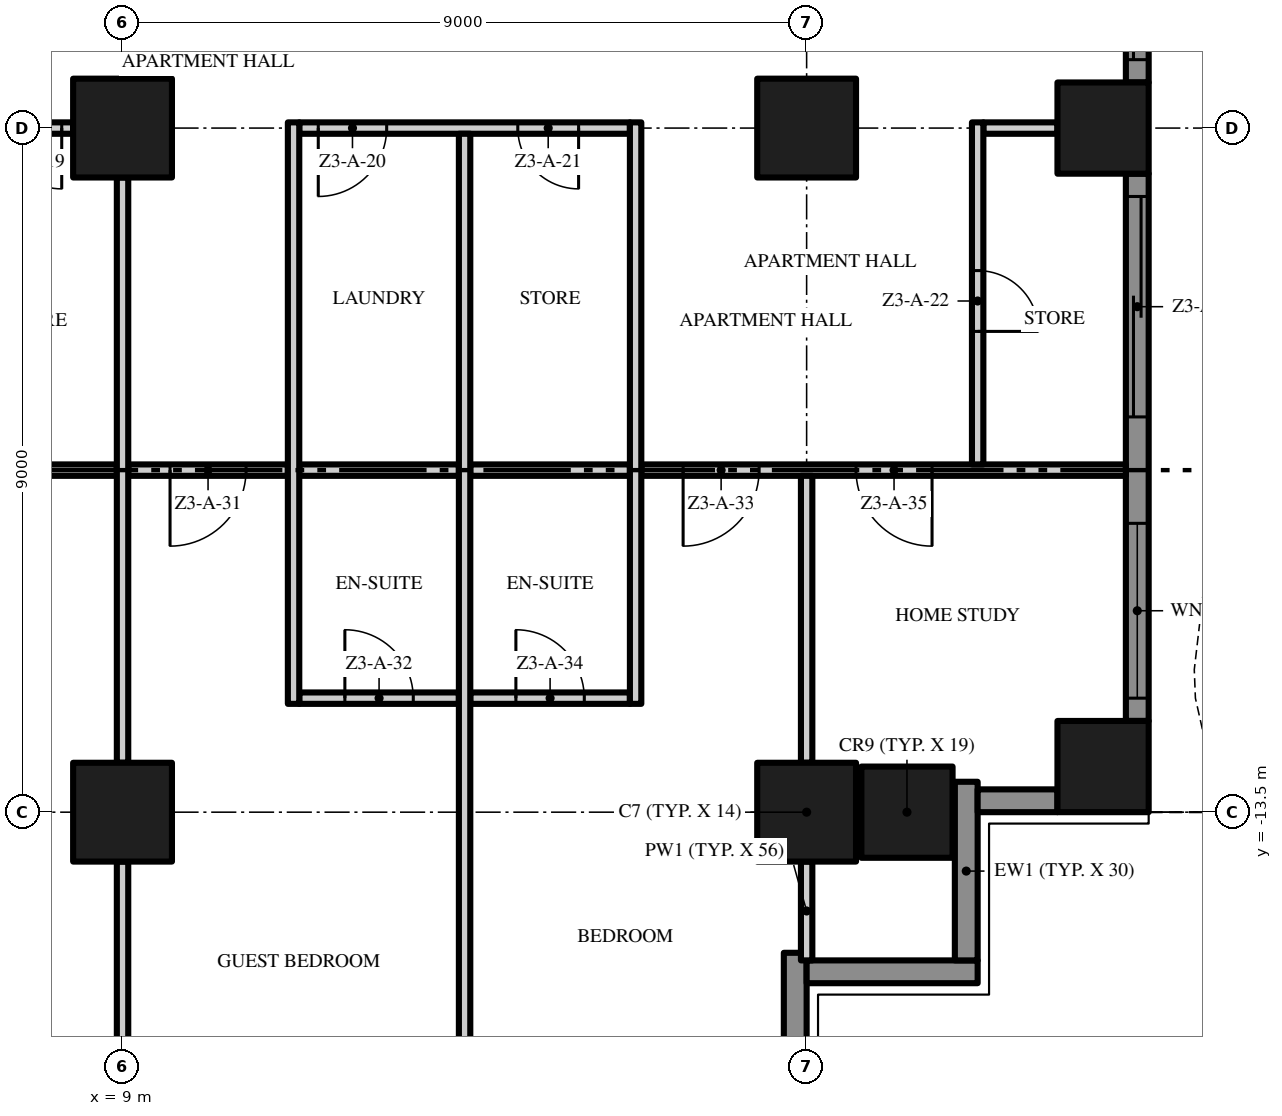
"""IFC4 building model, lengths in metres.
Left out: names, types, materials, properties, quantities, classifications, styles, units other than length and angle.
Written with IfcOpenShell. Run it as: python <this file> out.ifc"""

import sys

from ifc_helpers import new_model, si_unit, direction, frame, frame_2d, origin, origin_2d, place, context, subcontext, project, spatial, polyline, rectangle, outline, extrude, element, fill, save


model = new_model("IFC4")
c1 = context("Model", 3, precision=1e-05, world=origin(), true_north=direction((0.0, 1.0)))
c2 = subcontext(c1, "Body", "Model", "MODEL_VIEW")
j1 = project(units=[si_unit("LENGTHUNIT", "METRE"), si_unit("PLANEANGLEUNIT", "RADIAN")], contexts=[c1])
p1 = place(None, origin())
s1 = spatial("IfcSite", under=j1, at=p1, CompositionType="ELEMENT")
p2 = place(p1, origin())
s2 = spatial("IfcBuilding", under=s1, at=p2, CompositionType="ELEMENT")
p3 = place(p2, frame((0.0, 0.0, 132.6)))
s3 = spatial("IfcBuildingStorey", under=s2, at=p3, CompositionType="ELEMENT", Elevation=132.6)
for number, where, z_axis, x_axis in (
    (1, (18.0, -13.5, 0.0), (0.0, 0.0, 1.0), (1.0, 0.0, 0.0)),
    (2, (18.0, -4.5, 0.0), (0.0, 0.0, 1.0), (1.0, 0.0, 0.0)),
):
    element("IfcColumn", number, at=place(p3, frame(where, z_axis=z_axis, x_axis=x_axis)), inside=s3, PredefinedType="COLUMN", context=c2, shape_type="SweptSolid", body=[
        extrude(rectangle(XDim=1.3, YDim=1.3, at=origin_2d()), origin(), (0.0, 0.0, 1.0), 3.5),
    ])
for number, where, z_axis, x_axis in (
    (3, (21.9, -12.9, 0.0), (0.0, 0.0, 1.0), (1.0, 0.0, 0.0)),
    (4, (19.32, -13.5, 0.0), (0.0, 0.0, 1.0), (1.0, 0.0, 0.0)),
    (5, (21.9, -4.5, 0.0), (0.0, 0.0, 1.0), (1.0, 0.0, 0.0)),
):
    element("IfcColumn", number, at=place(p3, frame(where, z_axis=z_axis, x_axis=x_axis)), inside=s3, PredefinedType="COLUMN", context=c2, shape_type="SweptSolid", body=[
        extrude(rectangle(XDim=1.2, YDim=1.2, at=origin_2d()), origin(), (0.0, 0.0, 1.0), 3.5),
    ])
for number, where, z_axis, x_axis in (
    (6, (9.0, -13.5, 0.0), (0.0, 0.0, 1.0), (1.0, 0.0, 0.0)),
    (7, (9.0, -4.5, 0.0), (0.0, 0.0, 1.0), (1.0, 0.0, 0.0)),
):
    element("IfcColumn", number, at=place(p3, frame(where, z_axis=z_axis, x_axis=x_axis)), inside=s3, PredefinedType="COLUMN", context=c2, shape_type="SweptSolid", body=[
        extrude(rectangle(XDim=1.3, YDim=1.3, at=origin_2d()), origin(), (0.0, 0.0, 1.0), 3.5),
    ])
p4 = place(p3, frame((17.85, -15.35, 0.0), z_axis=(0.0, 0.0, 1.0), x_axis=(0.0, -1.0, 0.0)))
e8 = element("IfcWall", 8, at=p4, inside=s3, PredefinedType="SOLIDWALL", context=c2, shape_type="SweptSolid", body=[
    extrude(rectangle(XDim=1.45, YDim=0.3, at=frame_2d((0.725, 0.0))), origin(), (0.0, 0.0, 1.0), 3.5),
])
p5 = place(p3, frame((20.25, -15.6, 0.0), z_axis=(0.0, 0.0, 1.0), x_axis=(-1.0, 0.0, 0.0)))
e9 = element("IfcWall", 9, at=p5, inside=s3, PredefinedType="SOLIDWALL", context=c2, shape_type="SweptSolid", body=[
    extrude(rectangle(XDim=2.25, YDim=0.3, at=frame_2d((1.125, 0.0))), origin(), (0.0, 0.0, 1.0), 3.5),
])
p6 = place(p3, frame((20.1, -13.1, 0.0), z_axis=(0.0, 0.0, 1.0), x_axis=(0.0, -1.0, 0.0)))
e10 = element("IfcWall", 10, at=p6, inside=s3, PredefinedType="SOLIDWALL", context=c2, shape_type="SweptSolid", body=[
    extrude(rectangle(XDim=2.35, YDim=0.3, at=frame_2d((1.175, 0.0))), origin(), (0.0, 0.0, 1.0), 3.5),
])
p7 = place(p3, frame((21.3, -13.35, 0.0), z_axis=(0.0, 0.0, 1.0), x_axis=(-1.0, 0.0, 0.0)))
e11 = element("IfcWall", 11, at=p7, inside=s3, PredefinedType="SOLIDWALL", context=c2, shape_type="SweptSolid", body=[
    extrude(rectangle(XDim=1.05, YDim=0.3, at=frame_2d((0.525, 0.0))), origin(), (0.0, 0.0, 1.0), 3.5),
])
p8 = place(p3, frame((22.35, -5.1, 0.0), z_axis=(0.0, 0.0, 1.0), x_axis=(0.0, -1.0, 0.0)))
e12 = element("IfcWall", 12, at=p8, inside=s3, PredefinedType="SOLIDWALL", context=c2, shape_type="SweptSolid", body=[
    extrude(rectangle(XDim=7.2, YDim=0.3, at=frame_2d((3.6, 0.0))), origin(), (0.0, 0.0, 1.0), 3.5),
])
p9 = place(p8, frame((4.6, 0.0, 0.45)))
e13 = element("IfcOpeningElement", 13, at=p9, cuts=e12, PredefinedType="OPENING", context=c2, shape_type="SweptSolid", body=[
    extrude(rectangle(XDim=2.3, YDim=2.65, at=frame_2d((1.15, 1.325))), frame((0.0, 0.16, 0.0), z_axis=(0.0, -1.0, 0.0), x_axis=(1.0, 0.0, 0.0)), (0.0, 0.0, 1.0), 0.32),
])
p10 = place(p8, frame((0.3, 0.0, 0.0)))
e14 = element("IfcOpeningElement", 14, at=p10, cuts=e12, PredefinedType="OPENING", context=c2, shape_type="SweptSolid", body=[
    extrude(rectangle(XDim=2.9, YDim=2.4, at=frame_2d((1.45, 1.2))), frame((0.0, 0.16, 0.0), z_axis=(0.0, -1.0, 0.0), x_axis=(1.0, 0.0, 0.0)), (0.0, 0.0, 1.0), 0.32),
])
p11 = place(p3, frame((22.35, 3.9, 0.0), z_axis=(0.0, 0.0, 1.0), x_axis=(0.0, -1.0, 0.0)))
e15 = element("IfcWall", 15, at=p11, inside=s3, PredefinedType="SOLIDWALL", context=c2, shape_type="SweptSolid", body=[
    extrude(rectangle(XDim=7.8, YDim=0.3, at=frame_2d((3.9, 0.0))), origin(), (0.0, 0.0, 1.0), 3.5),
])
p12 = place(p11, frame((4.6, 0.0, 0.0)))
e16 = element("IfcOpeningElement", 16, at=p12, cuts=e15, PredefinedType="OPENING", context=c2, shape_type="SweptSolid", body=[
    extrude(rectangle(XDim=2.9, YDim=2.4, at=frame_2d((1.45, 1.2))), frame((0.0, 0.16, 0.0), z_axis=(0.0, -1.0, 0.0), x_axis=(1.0, 0.0, 0.0)), (0.0, 0.0, 1.0), 0.32),
])
p13 = place(p11, frame((0.3, 0.0, 0.45)))
e17 = element("IfcOpeningElement", 17, at=p13, cuts=e15, PredefinedType="OPENING", context=c2, shape_type="SweptSolid", body=[
    extrude(rectangle(XDim=2.9, YDim=2.65, at=frame_2d((1.45, 1.325))), frame((0.0, 0.16, 0.0), z_axis=(0.0, -1.0, 0.0), x_axis=(1.0, 0.0, 0.0)), (0.0, 0.0, 1.0), 0.32),
])
p14 = place(p3, origin())
e18 = element("IfcWall", 18, at=p14, inside=s3, PredefinedType="USERDEFINED", context=c2, shape_type="SweptSolid", body=[
    extrude(outline(polyline([(23.451, -13.5), (23.115, -12.0), (23.1, -11.625), (23.231, -10.5), (23.755, -9.0), (24.488, -7.5), (25.149, -6.0), (25.485, -4.5), (25.5, -4.125), (25.369, -3.0), (24.845, -1.5), (24.112, 0.0), (23.451, 1.5), (23.115, 3.0), (23.1, 3.375), (23.231, 4.5), (23.755, 6.0), (24.488, 7.5), (25.149, 9.0), (25.485, 10.5), (25.5, 10.875), (25.369, 12.0), (24.845, 13.5), (24.112, 15.0), (23.451, 16.5), (23.115, 18.0), (22.871, 17.945), (23.213, 16.421), (23.885, 14.895), (24.614, 13.404), (25.124, 11.944), (25.249, 10.865), (25.236, 10.533), (24.91, 9.079), (24.261, 7.605), (23.524, 6.096), (22.986, 4.556), (22.849, 3.385), (22.866, 2.967), (23.213, 1.421), (23.885, -0.105), (24.614, -1.596), (25.124, -3.056), (25.249, -4.135), (25.236, -4.467), (24.91, -5.921), (24.261, -7.395), (23.524, -8.904), (22.986, -10.444), (22.849, -11.615), (22.866, -12.033), (23.208, -13.555), (23.451, -13.5)])), origin(), (0.0, 0.0, 1.0), 0.9),
])
p15 = place(p3, frame((11.325, -12.0, 0.0), z_axis=(0.0, 0.0, 1.0), x_axis=(1.0, 0.0, 0.0)))
e19 = element("IfcWall", 19, at=p15, inside=s3, PredefinedType="PARTITIONING", context=c2, shape_type="SweptSolid", body=[
    extrude(rectangle(XDim=2.1, YDim=0.15, at=frame_2d((1.05, 0.0))), origin(), (0.0, 0.0, 1.0), 3.5),
])
p16 = place(p15, frame((0.6, 0.0, 0.0)))
e20 = element("IfcOpeningElement", 20, at=p16, cuts=e19, PredefinedType="OPENING", context=c2, shape_type="SweptSolid", body=[
    extrude(rectangle(XDim=0.9, YDim=2.1, at=frame_2d((0.45, 1.05))), frame((0.0, 0.085, 0.0), z_axis=(0.0, -1.0, 0.0), x_axis=(1.0, 0.0, 0.0)), (0.0, 0.0, 1.0), 0.17),
])
p17 = place(p3, frame((13.575, -12.0, 0.0), z_axis=(0.0, 0.0, 1.0), x_axis=(1.0, 0.0, 0.0)))
e21 = element("IfcWall", 21, at=p17, inside=s3, PredefinedType="PARTITIONING", context=c2, shape_type="SweptSolid", body=[
    extrude(rectangle(XDim=2.1, YDim=0.15, at=frame_2d((1.05, 0.0))), origin(), (0.0, 0.0, 1.0), 3.5),
])
p18 = place(p17, frame((0.6, 0.0, 0.0)))
e22 = element("IfcOpeningElement", 22, at=p18, cuts=e21, PredefinedType="OPENING", context=c2, shape_type="SweptSolid", body=[
    extrude(rectangle(XDim=0.9, YDim=2.1, at=frame_2d((0.45, 1.05))), frame((0.0, 0.085, 0.0), z_axis=(0.0, -1.0, 0.0), x_axis=(1.0, 0.0, 0.0)), (0.0, 0.0, 1.0), 0.17),
])
p19 = place(p3, frame((8.925, -9.0, 0.0), z_axis=(0.0, 0.0, 1.0), x_axis=(-1.0, 0.0, 0.0)))
e23 = element("IfcWall", 23, at=p19, inside=s3, PredefinedType="PARTITIONING", context=c2, shape_type="SweptSolid", body=[
    extrude(rectangle(XDim=8.85, YDim=0.15, at=frame_2d((4.425, 0.0))), origin(), (0.0, 0.0, 1.0), 3.5),
])
p20 = place(p19, frame((6.3, 0.0, 0.0)))
e24 = element("IfcOpeningElement", 24, at=p20, cuts=e23, PredefinedType="OPENING", context=c2, shape_type="SweptSolid", body=[
    extrude(rectangle(XDim=1.5, YDim=2.4, at=frame_2d((0.75, 1.2))), frame((0.0, 0.085, 0.0), z_axis=(0.0, -1.0, 0.0), x_axis=(1.0, 0.0, 0.0)), (0.0, 0.0, 1.0), 0.17),
])
p21 = place(p3, frame((11.175, -9.0, 0.0), z_axis=(0.0, 0.0, 1.0), x_axis=(-1.0, 0.0, 0.0)))
e25 = element("IfcWall", 25, at=p21, inside=s3, PredefinedType="PARTITIONING", context=c2, shape_type="SweptSolid", body=[
    extrude(rectangle(XDim=2.1, YDim=0.15, at=frame_2d((1.05, 0.0))), origin(), (0.0, 0.0, 1.0), 3.5),
])
p22 = place(p21, frame((0.55, 0.0, 0.0)))
e26 = element("IfcOpeningElement", 26, at=p22, cuts=e25, PredefinedType="OPENING", context=c2, shape_type="SweptSolid", body=[
    extrude(rectangle(XDim=1.0, YDim=2.4, at=frame_2d((0.5, 1.2))), frame((0.0, 0.085, 0.0), z_axis=(0.0, -1.0, 0.0), x_axis=(1.0, 0.0, 0.0)), (0.0, 0.0, 1.0), 0.17),
])
for number, where, z_axis, x_axis in (
    (27, (11.325, -9.0, 0.0), (0.0, 0.0, 1.0), (1.0, 0.0, 0.0)),
    (28, (13.575, -9.0, 0.0), (0.0, 0.0, 1.0), (1.0, 0.0, 0.0)),
):
    element("IfcWall", number, at=place(p3, frame(where, z_axis=z_axis, x_axis=x_axis)), inside=s3, PredefinedType="PARTITIONING", context=c2, shape_type="SweptSolid", body=[
        extrude(rectangle(XDim=2.1, YDim=0.15, at=frame_2d((1.05, 0.0))), origin(), (0.0, 0.0, 1.0), 3.5),
    ])
p23 = place(p3, frame((22.2, -9.0, 0.0), z_axis=(0.0, 0.0, 1.0), x_axis=(-1.0, 0.0, 0.0)))
e29 = element("IfcWall", 29, at=p23, inside=s3, PredefinedType="PARTITIONING", context=c2, shape_type="SweptSolid", body=[
    extrude(rectangle(XDim=6.375, YDim=0.15, at=frame_2d((3.188, 0.0))), origin(), (0.0, 0.0, 1.0), 3.5),
])
p24 = place(p23, frame((4.825, 0.0, 0.0)))
e30 = element("IfcOpeningElement", 30, at=p24, cuts=e29, PredefinedType="OPENING", context=c2, shape_type="SweptSolid", body=[
    extrude(rectangle(XDim=1.0, YDim=2.4, at=frame_2d((0.5, 1.2))), frame((0.0, 0.085, 0.0), z_axis=(0.0, -1.0, 0.0), x_axis=(1.0, 0.0, 0.0)), (0.0, 0.0, 1.0), 0.17),
])
p25 = place(p23, frame((2.55, 0.0, 0.0)))
e31 = element("IfcOpeningElement", 31, at=p25, cuts=e29, PredefinedType="OPENING", context=c2, shape_type="SweptSolid", body=[
    extrude(rectangle(XDim=1.0, YDim=2.4, at=frame_2d((0.5, 1.2))), frame((0.0, 0.085, 0.0), z_axis=(0.0, -1.0, 0.0), x_axis=(1.0, 0.0, 0.0)), (0.0, 0.0, 1.0), 0.17),
])
p26 = place(p3, frame((8.35, -4.5, 0.0), z_axis=(0.0, 0.0, 1.0), x_axis=(-1.0, 0.0, 0.0)))
e32 = element("IfcWall", 32, at=p26, inside=s3, PredefinedType="PARTITIONING", context=c2, shape_type="SweptSolid", body=[
    extrude(rectangle(XDim=4.525, YDim=0.15, at=frame_2d((2.263, 0.0))), origin(), (0.0, 0.0, 1.0), 3.5),
])
p27 = place(p26, frame((2.675, 0.0, 0.0)))
e33 = element("IfcOpeningElement", 33, at=p27, cuts=e32, PredefinedType="OPENING", context=c2, shape_type="SweptSolid", body=[
    extrude(rectangle(XDim=0.9, YDim=2.1, at=frame_2d((0.45, 1.05))), frame((0.0, 0.085, 0.0), z_axis=(0.0, -1.0, 0.0), x_axis=(1.0, 0.0, 0.0)), (0.0, 0.0, 1.0), 0.17),
])
p28 = place(p26, frame((0.15, 0.0, 0.0)))
e34 = element("IfcOpeningElement", 34, at=p28, cuts=e32, PredefinedType="OPENING", context=c2, shape_type="SweptSolid", body=[
    extrude(rectangle(XDim=0.8, YDim=2.0, at=frame_2d((0.4, 1.0))), frame((0.0, 0.085, 0.0), z_axis=(0.0, -1.0, 0.0), x_axis=(1.0, 0.0, 0.0)), (0.0, 0.0, 1.0), 0.17),
])
p29 = place(p3, frame((15.675, -4.5, 0.0), z_axis=(0.0, 0.0, 1.0), x_axis=(-1.0, 0.0, 0.0)))
e35 = element("IfcWall", 35, at=p29, inside=s3, PredefinedType="PARTITIONING", context=c2, shape_type="SweptSolid", body=[
    extrude(rectangle(XDim=4.35, YDim=0.15, at=frame_2d((2.175, 0.0))), origin(), (0.0, 0.0, 1.0), 3.5),
])
p30 = place(p29, frame((3.2, 0.0, 0.0)))
e36 = element("IfcOpeningElement", 36, at=p30, cuts=e35, PredefinedType="OPENING", context=c2, shape_type="SweptSolid", body=[
    extrude(rectangle(XDim=0.9, YDim=2.1, at=frame_2d((0.45, 1.05))), frame((0.0, 0.085, 0.0), z_axis=(0.0, -1.0, 0.0), x_axis=(1.0, 0.0, 0.0)), (0.0, 0.0, 1.0), 0.17),
])
p31 = place(p29, frame((0.675, 0.0, 0.0)))
e37 = element("IfcOpeningElement", 37, at=p31, cuts=e35, PredefinedType="OPENING", context=c2, shape_type="SweptSolid", body=[
    extrude(rectangle(XDim=0.8, YDim=2.0, at=frame_2d((0.4, 1.0))), frame((0.0, 0.085, 0.0), z_axis=(0.0, -1.0, 0.0), x_axis=(1.0, 0.0, 0.0)), (0.0, 0.0, 1.0), 0.17),
])
p32 = place(p3, frame((20.325, -4.5, 0.0), z_axis=(0.0, 0.0, 1.0), x_axis=(1.0, 0.0, 0.0)))
e38 = element("IfcWall", 38, at=p32, inside=s3, PredefinedType="PARTITIONING", context=c2, shape_type="SweptSolid", body=[
    extrude(rectangle(XDim=0.975, YDim=0.15, at=frame_2d((0.487, 0.0))), origin(), (0.0, 0.0, 1.0), 3.5),
])
p33 = place(p3, frame((9.0, -16.8, 0.0), z_axis=(0.0, 0.0, 1.0), x_axis=(0.0, 1.0, 0.0)))
e39 = element("IfcWall", 39, at=p33, inside=s3, PredefinedType="PARTITIONING", context=c2, shape_type="SweptSolid", body=[
    extrude(rectangle(XDim=2.65, YDim=0.15, at=frame_2d((1.325, 0.0))), origin(), (0.0, 0.0, 1.0), 3.5),
])
p34 = place(p3, frame((9.0, -12.85, 0.0), z_axis=(0.0, 0.0, 1.0), x_axis=(0.0, 1.0, 0.0)))
e40 = element("IfcWall", 40, at=p34, inside=s3, PredefinedType="PARTITIONING", context=c2, shape_type="SweptSolid", body=[
    extrude(rectangle(XDim=7.7, YDim=0.15, at=frame_2d((3.85, 0.0))), origin(), (0.0, 0.0, 1.0), 3.5),
])
p35 = place(p3, frame((11.25, -12.075, 0.0), z_axis=(0.0, 0.0, 1.0), x_axis=(0.0, 1.0, 0.0)))
e41 = element("IfcWall", 41, at=p35, inside=s3, PredefinedType="PARTITIONING", context=c2, shape_type="SweptSolid", body=[
    extrude(rectangle(XDim=7.65, YDim=0.15, at=frame_2d((3.825, 0.0))), origin(), (0.0, 0.0, 1.0), 3.5),
])
p36 = place(p3, frame((13.5, -17.7, 0.0), z_axis=(0.0, 0.0, 1.0), x_axis=(0.0, 1.0, 0.0)))
e42 = element("IfcWall", 42, at=p36, inside=s3, PredefinedType="PARTITIONING", context=c2, shape_type="SweptSolid", body=[
    extrude(rectangle(XDim=13.125, YDim=0.15, at=frame_2d((6.562, 0.0))), origin(), (0.0, 0.0, 1.0), 3.5),
])
p37 = place(p3, frame((15.75, -12.075, 0.0), z_axis=(0.0, 0.0, 1.0), x_axis=(0.0, 1.0, 0.0)))
e43 = element("IfcWall", 43, at=p37, inside=s3, PredefinedType="PARTITIONING", context=c2, shape_type="SweptSolid", body=[
    extrude(rectangle(XDim=7.65, YDim=0.15, at=frame_2d((3.825, 0.0))), origin(), (0.0, 0.0, 1.0), 3.5),
])
p38 = place(p3, frame((18.0, -15.45, 0.0), z_axis=(0.0, 0.0, 1.0), x_axis=(0.0, 1.0, 0.0)))
e44 = element("IfcWall", 44, at=p38, inside=s3, PredefinedType="PARTITIONING", context=c2, shape_type="SweptSolid", body=[
    extrude(rectangle(XDim=1.3, YDim=0.15, at=frame_2d((0.65, 0.0))), origin(), (0.0, 0.0, 1.0), 3.5),
])
p39 = place(p3, frame((18.0, -12.85, 0.0), z_axis=(0.0, 0.0, 1.0), x_axis=(0.0, 1.0, 0.0)))
e45 = element("IfcWall", 45, at=p39, inside=s3, PredefinedType="PARTITIONING", context=c2, shape_type="SweptSolid", body=[
    extrude(rectangle(XDim=3.775, YDim=0.15, at=frame_2d((1.887, 0.0))), origin(), (0.0, 0.0, 1.0), 3.5),
])
p40 = place(p3, frame((20.25, -4.425, 0.0), z_axis=(0.0, 0.0, 1.0), x_axis=(0.0, -1.0, 0.0)))
e46 = element("IfcWall", 46, at=p40, inside=s3, PredefinedType="PARTITIONING", context=c2, shape_type="SweptSolid", body=[
    extrude(rectangle(XDim=4.5, YDim=0.15, at=frame_2d((2.25, 0.0))), origin(), (0.0, 0.0, 1.0), 3.5),
])
p41 = place(p40, frame((1.95, 0.0, 0.0)))
e47 = element("IfcOpeningElement", 47, at=p41, cuts=e46, PredefinedType="OPENING", context=c2, shape_type="SweptSolid", body=[
    extrude(rectangle(XDim=0.8, YDim=2.0, at=frame_2d((0.4, 1.0))), frame((0.0, 0.085, 0.0), z_axis=(0.0, -1.0, 0.0), x_axis=(1.0, 0.0, 0.0)), (0.0, 0.0, 1.0), 0.17),
])
p42 = place(p9, origin())
e48 = element("IfcWindow", 48, at=p42, inside=s3, PartitioningType="SINGLE_PANEL", PredefinedType="WINDOW", context=c2, shape_type="SweptSolid", body=[
    extrude(rectangle(XDim=2.3, YDim=2.65, at=frame_2d((1.15, 1.325))), frame((0.0, 0.03, 0.0), z_axis=(0.0, -1.0, 0.0), x_axis=(1.0, 0.0, 0.0)), (0.0, 0.0, 1.0), 0.06),
])
fill(e13, e48)
p43 = place(p10, origin())
e49 = element("IfcDoor", 49, at=p43, inside=s3, OperationType="SINGLE_SWING_LEFT", PredefinedType="DOOR", context=c2, shape_type="SweptSolid", body=[
    extrude(rectangle(XDim=2.9, YDim=2.4, at=frame_2d((1.45, 1.2))), frame((0.0, 0.025, 0.0), z_axis=(0.0, -1.0, 0.0), x_axis=(1.0, 0.0, 0.0)), (0.0, 0.0, 1.0), 0.05),
])
fill(e14, e49)
p44 = place(p12, origin())
e50 = element("IfcDoor", 50, at=p44, inside=s3, OperationType="SINGLE_SWING_LEFT", PredefinedType="DOOR", context=c2, shape_type="SweptSolid", body=[
    extrude(rectangle(XDim=2.9, YDim=2.4, at=frame_2d((1.45, 1.2))), frame((0.0, 0.025, 0.0), z_axis=(0.0, -1.0, 0.0), x_axis=(1.0, 0.0, 0.0)), (0.0, 0.0, 1.0), 0.05),
])
fill(e16, e50)
p45 = place(p28, origin())
e51 = element("IfcDoor", 51, at=p45, inside=s3, OperationType="SINGLE_SWING_LEFT", PredefinedType="DOOR", context=c2, shape_type="SweptSolid", body=[
    extrude(rectangle(XDim=0.8, YDim=2.0, at=frame_2d((0.4, 1.0))), frame((0.0, 0.025, 0.0), z_axis=(0.0, -1.0, 0.0), x_axis=(1.0, 0.0, 0.0)), (0.0, 0.0, 1.0), 0.05),
])
fill(e34, e51)
p46 = place(p30, origin())
e52 = element("IfcDoor", 52, at=p46, inside=s3, OperationType="SINGLE_SWING_RIGHT", PredefinedType="DOOR", context=c2, shape_type="SweptSolid", body=[
    extrude(rectangle(XDim=0.9, YDim=2.1, at=frame_2d((0.45, 1.05))), frame((0.0, 0.025, 0.0), z_axis=(0.0, -1.0, 0.0), x_axis=(1.0, 0.0, 0.0)), (0.0, 0.0, 1.0), 0.05),
])
fill(e36, e52)
p47 = place(p31, origin())
e53 = element("IfcDoor", 53, at=p47, inside=s3, OperationType="SINGLE_SWING_LEFT", PredefinedType="DOOR", context=c2, shape_type="SweptSolid", body=[
    extrude(rectangle(XDim=0.8, YDim=2.0, at=frame_2d((0.4, 1.0))), frame((0.0, 0.025, 0.0), z_axis=(0.0, -1.0, 0.0), x_axis=(1.0, 0.0, 0.0)), (0.0, 0.0, 1.0), 0.05),
])
fill(e37, e53)
p48 = place(p41, origin())
e54 = element("IfcDoor", 54, at=p48, inside=s3, OperationType="SINGLE_SWING_RIGHT", PredefinedType="DOOR", context=c2, shape_type="SweptSolid", body=[
    extrude(rectangle(XDim=0.8, YDim=2.0, at=frame_2d((0.4, 1.0))), frame((0.0, 0.025, 0.0), z_axis=(0.0, -1.0, 0.0), x_axis=(1.0, 0.0, 0.0)), (0.0, 0.0, 1.0), 0.05),
])
fill(e47, e54)
p49 = place(p22, origin())
e55 = element("IfcDoor", 55, at=p49, inside=s3, OperationType="SINGLE_SWING_RIGHT", PredefinedType="DOOR", context=c2, shape_type="SweptSolid", body=[
    extrude(rectangle(XDim=1.0, YDim=2.4, at=frame_2d((0.5, 1.2))), frame((0.0, 0.025, 0.0), z_axis=(0.0, -1.0, 0.0), x_axis=(1.0, 0.0, 0.0)), (0.0, 0.0, 1.0), 0.05),
])
fill(e26, e55)
p50 = place(p16, origin())
e56 = element("IfcDoor", 56, at=p50, inside=s3, OperationType="SINGLE_SWING_LEFT", PredefinedType="DOOR", context=c2, shape_type="SweptSolid", body=[
    extrude(rectangle(XDim=0.9, YDim=2.1, at=frame_2d((0.45, 1.05))), frame((0.0, 0.025, 0.0), z_axis=(0.0, -1.0, 0.0), x_axis=(1.0, 0.0, 0.0)), (0.0, 0.0, 1.0), 0.05),
])
fill(e20, e56)
p51 = place(p24, origin())
e57 = element("IfcDoor", 57, at=p51, inside=s3, OperationType="SINGLE_SWING_RIGHT", PredefinedType="DOOR", context=c2, shape_type="SweptSolid", body=[
    extrude(rectangle(XDim=1.0, YDim=2.4, at=frame_2d((0.5, 1.2))), frame((0.0, 0.025, 0.0), z_axis=(0.0, -1.0, 0.0), x_axis=(1.0, 0.0, 0.0)), (0.0, 0.0, 1.0), 0.05),
])
fill(e30, e57)
p52 = place(p18, origin())
e58 = element("IfcDoor", 58, at=p52, inside=s3, OperationType="SINGLE_SWING_LEFT", PredefinedType="DOOR", context=c2, shape_type="SweptSolid", body=[
    extrude(rectangle(XDim=0.9, YDim=2.1, at=frame_2d((0.45, 1.05))), frame((0.0, 0.025, 0.0), z_axis=(0.0, -1.0, 0.0), x_axis=(1.0, 0.0, 0.0)), (0.0, 0.0, 1.0), 0.05),
])
fill(e22, e58)
p53 = place(p25, origin())
e59 = element("IfcDoor", 59, at=p53, inside=s3, OperationType="SINGLE_SWING_LEFT", PredefinedType="DOOR", context=c2, shape_type="SweptSolid", body=[
    extrude(rectangle(XDim=1.0, YDim=2.4, at=frame_2d((0.5, 1.2))), frame((0.0, 0.025, 0.0), z_axis=(0.0, -1.0, 0.0), x_axis=(1.0, 0.0, 0.0)), (0.0, 0.0, 1.0), 0.05),
])
fill(e31, e59)
save(model, sys.argv[1])
